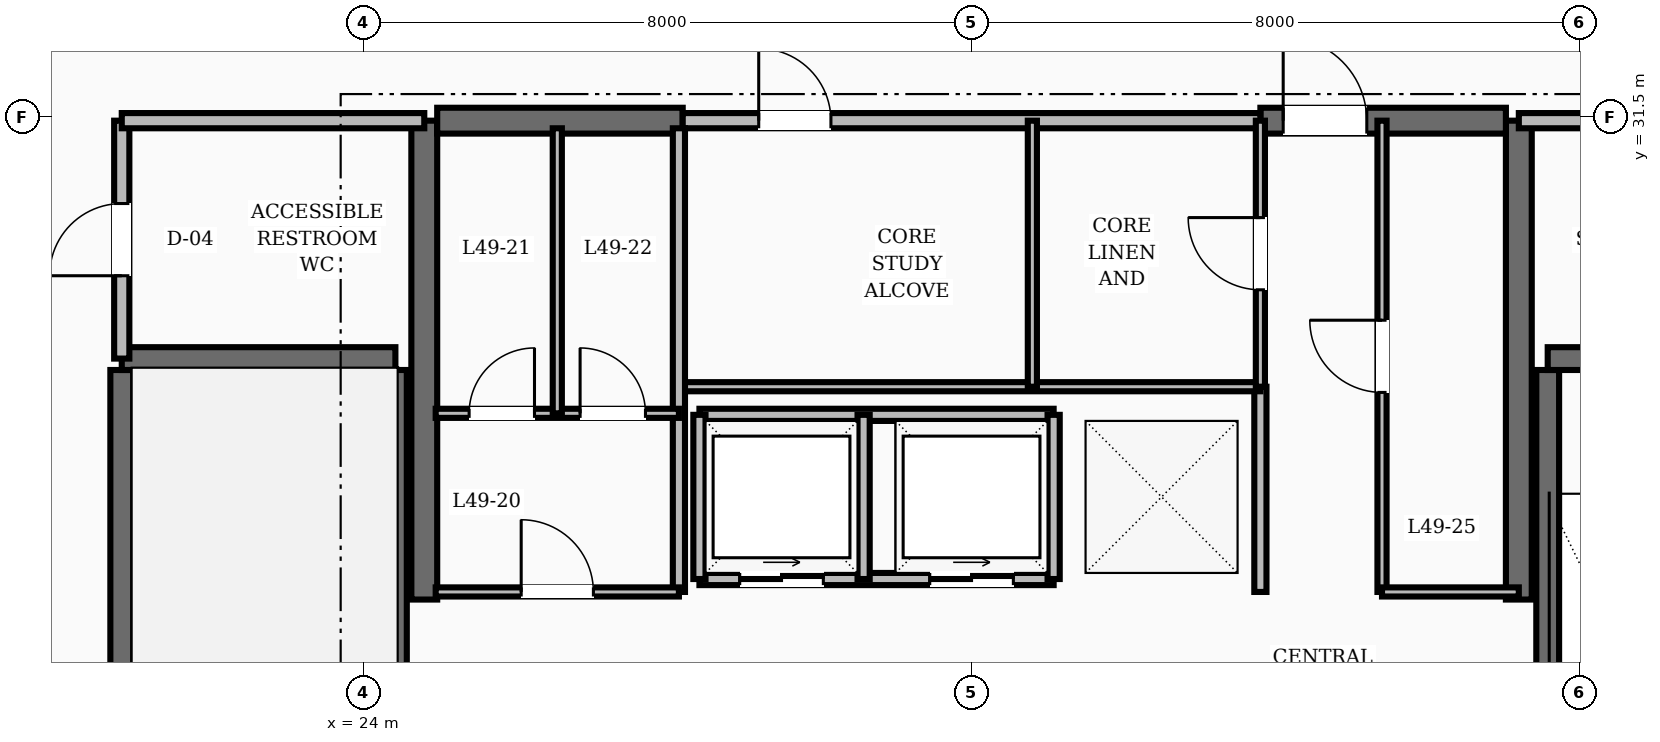
"""IFC4 building model, lengths in metres.
Left out: names, types, materials, properties, quantities, classifications, styles, units other than length and angle.
Written with IfcOpenShell. Run it as: python <this file> out.ifc"""

import sys

from ifc_helpers import new_model, si_unit, direction, frame, frame_2d, origin, place, context, subcontext, project, spatial, rectangle, extrude, element, fill, save


model = new_model("IFC4")
c1 = context("Model", 3, precision=1e-05, world=origin(), true_north=direction((0.0, 1.0)))
c2 = subcontext(c1, "Body", "Model", "MODEL_VIEW")
j1 = project(units=[si_unit("LENGTHUNIT", "METRE"), si_unit("PLANEANGLEUNIT", "RADIAN")], contexts=[c1])
p1 = place(None, origin())
s1 = spatial("IfcSite", under=j1, at=p1, CompositionType="ELEMENT")
p2 = place(p1, origin())
s2 = spatial("IfcBuilding", under=s1, at=p2, CompositionType="ELEMENT")
p3 = place(p2, frame((0.0, 0.0, 189.2)))
s3 = spatial("IfcBuildingStorey", under=s2, at=p3, CompositionType="ELEMENT", Elevation=189.2)
for number, where, z_axis, x_axis in (
    (1, (24.8, 25.15, 0.0), (0.0, 0.0, 1.0), (0.0, 1.0, 0.0)),
    (2, (39.2, 25.15, 0.0), (0.0, 0.0, 1.0), (0.0, 1.0, 0.0)),
):
    element("IfcWall", number, at=place(p3, frame(where, z_axis=z_axis, x_axis=x_axis)), inside=s3, PredefinedType="SHEAR", context=c2, shape_type="SweptSolid", body=[
        extrude(rectangle(XDim=6.3, YDim=0.34, at=frame_2d((3.15, 0.0))), origin(), (0.0, 0.0, 1.0), 3.6),
    ])
p4 = place(p3, frame((24.97, 31.45, 0.0), z_axis=(0.0, 0.0, 1.0), x_axis=(1.0, 0.0, 0.0)))
e3 = element("IfcWall", 3, at=p4, inside=s3, PredefinedType="SHEAR", context=c2, shape_type="SweptSolid", body=[
    extrude(rectangle(XDim=3.23, YDim=0.34, at=frame_2d((1.615, 0.0))), origin(), (0.0, 0.0, 1.0), 3.6),
])
p5 = place(p3, frame((35.8, 31.45, 0.0), z_axis=(0.0, 0.0, 1.0), x_axis=(1.0, 0.0, 0.0)))
e4 = element("IfcWall", 4, at=p5, inside=s3, PredefinedType="SHEAR", context=c2, shape_type="SweptSolid", body=[
    extrude(rectangle(XDim=3.23, YDim=0.34, at=frame_2d((1.615, 0.0))), origin(), (0.0, 0.0, 1.0), 3.6),
])
p6 = place(p5, frame((0.3, 0.0, 0.0)))
e5 = element("IfcOpeningElement", 5, at=p6, cuts=e4, PredefinedType="OPENING", context=c2, shape_type="SweptSolid", body=[
    extrude(rectangle(XDim=1.1, YDim=2.1, at=frame_2d((0.55, 1.05))), frame((0.0, 0.18, 0.0), z_axis=(0.0, -1.0, 0.0), x_axis=(1.0, 0.0, 0.0)), (0.0, 0.0, 1.0), 0.36),
])
for number, where, z_axis, x_axis in (
    (6, (20.82, 19.43, 0.0), (0.0, 0.0, 1.0), (0.0, 1.0, 0.0)),
    (7, (24.42, 19.43, 0.0), (0.0, 0.0, 1.0), (0.0, 1.0, 0.0)),
):
    element("IfcWall", number, at=place(p3, frame(where, z_axis=z_axis, x_axis=x_axis)), inside=s3, PredefinedType="SHEAR", context=c2, shape_type="SweptSolid", body=[
        extrude(rectangle(XDim=8.74, YDim=0.3, at=frame_2d((4.37, 0.0))), origin(), (0.0, 0.0, 1.0), 3.6),
    ])
p7 = place(p3, frame((20.82, 28.32, 0.0), z_axis=(0.0, 0.0, 1.0), x_axis=(1.0, 0.0, 0.0)))
e8 = element("IfcWall", 8, at=p7, inside=s3, PredefinedType="SHEAR", context=c2, shape_type="SweptSolid", body=[
    extrude(rectangle(XDim=3.6, YDim=0.3, at=frame_2d((1.8, 0.0))), origin(), (0.0, 0.0, 1.0), 3.6),
])
p8 = place(p3, frame((39.58, 19.43, 0.0), z_axis=(0.0, 0.0, 1.0), x_axis=(0.0, 1.0, 0.0)))
e9 = element("IfcWall", 9, at=p8, inside=s3, PredefinedType="SHEAR", context=c2, shape_type="SweptSolid", body=[
    extrude(rectangle(XDim=8.74, YDim=0.3, at=frame_2d((4.37, 0.0))), origin(), (0.0, 0.0, 1.0), 3.6),
])
p9 = place(p3, frame((39.58, 28.32, 0.0), z_axis=(0.0, 0.0, 1.0), x_axis=(1.0, 0.0, 0.0)))
e10 = element("IfcWall", 10, at=p9, inside=s3, PredefinedType="SHEAR", context=c2, shape_type="SweptSolid", body=[
    extrude(rectangle(XDim=3.6, YDim=0.3, at=frame_2d((1.8, 0.0))), origin(), (0.0, 0.0, 1.0), 3.6),
])
p10 = place(p9, frame((1.3, 0.0, 0.0)))
e11 = element("IfcOpeningElement", 11, at=p10, cuts=e10, PredefinedType="OPENING", context=c2, shape_type="SweptSolid", body=[
    extrude(rectangle(XDim=1.1, YDim=2.1, at=frame_2d((0.55, 1.05))), frame((0.0, 0.16, 0.0), z_axis=(0.0, -1.0, 0.0), x_axis=(1.0, 0.0, 0.0)), (0.0, 0.0, 1.0), 0.32),
])
p11 = place(p3, frame((39.2, 31.45, 0.0), z_axis=(0.0, 0.0, 1.0), x_axis=(1.0, 0.0, 0.0)))
e12 = element("IfcWall", 12, at=p11, inside=s3, PredefinedType="SOLIDWALL", context=c2, shape_type="SweptSolid", body=[
    extrude(rectangle(XDim=3.98, YDim=0.2, at=frame_2d((1.99, 0.0))), origin(), (0.0, 0.0, 1.0), 2.8),
])
p12 = place(p3, frame((20.82, 28.32, 0.0), z_axis=(0.0, 0.0, 1.0), x_axis=(0.0, 1.0, 0.0)))
e13 = element("IfcWall", 13, at=p12, inside=s3, PredefinedType="SOLIDWALL", context=c2, shape_type="SweptSolid", body=[
    extrude(rectangle(XDim=3.13, YDim=0.2, at=frame_2d((1.565, 0.0))), origin(), (0.0, 0.0, 1.0), 2.8),
])
p13 = place(p12, frame((1.09, 0.0, 0.0)))
e14 = element("IfcOpeningElement", 14, at=p13, cuts=e13, PredefinedType="OPENING", context=c2, shape_type="SweptSolid", body=[
    extrude(rectangle(XDim=0.95, YDim=2.1, at=frame_2d((0.475, 1.05))), frame((0.0, 0.11, 0.0), z_axis=(0.0, -1.0, 0.0), x_axis=(1.0, 0.0, 0.0)), (0.0, 0.0, 1.0), 0.22),
])
p14 = place(p3, frame((20.82, 31.45, 0.0), z_axis=(0.0, 0.0, 1.0), x_axis=(1.0, 0.0, 0.0)))
e15 = element("IfcWall", 15, at=p14, inside=s3, PredefinedType="SOLIDWALL", context=c2, shape_type="SweptSolid", body=[
    extrude(rectangle(XDim=3.98, YDim=0.2, at=frame_2d((1.99, 0.0))), origin(), (0.0, 0.0, 1.0), 2.8),
])
p15 = place(p3, frame((35.8, 25.25, 0.0), z_axis=(0.0, 0.0, 1.0), x_axis=(0.0, 1.0, 0.0)))
e16 = element("IfcWall", 16, at=p15, inside=s3, PredefinedType="SOLIDWALL", context=c2, shape_type="SweptSolid", body=[
    extrude(rectangle(XDim=2.7, YDim=0.16, at=frame_2d((1.35, 0.0))), origin(), (0.0, 0.0, 1.0), 2.8),
])
p16 = place(p3, frame((28.42, 25.42, 0.0), z_axis=(0.0, 0.0, 1.0), x_axis=(1.0, 0.0, 0.0)))
e17 = element("IfcWall", 17, at=p16, inside=s3, PredefinedType="SOLIDWALL", context=c2, shape_type="SweptSolid", body=[
    extrude(rectangle(XDim=4.66, YDim=0.16, at=frame_2d((2.33, 0.0))), origin(), (0.0, 0.0, 1.0), 2.8),
])
p17 = place(p16, frame((0.53, 0.0, 0.0)))
e18 = element("IfcOpeningElement", 18, at=p17, cuts=e17, PredefinedType="OPENING", context=c2, shape_type="SweptSolid", body=[
    extrude(rectangle(XDim=1.1, YDim=2.15, at=frame_2d((0.55, 1.075))), frame((0.0, 0.09, 0.0), z_axis=(0.0, -1.0, 0.0), x_axis=(1.0, 0.0, 0.0)), (0.0, 0.0, 1.0), 0.18),
])
p18 = place(p16, frame((3.03, 0.0, 0.0)))
e19 = element("IfcOpeningElement", 19, at=p18, cuts=e17, PredefinedType="OPENING", context=c2, shape_type="SweptSolid", body=[
    extrude(rectangle(XDim=1.1, YDim=2.15, at=frame_2d((0.55, 1.075))), frame((0.0, 0.09, 0.0), z_axis=(0.0, -1.0, 0.0), x_axis=(1.0, 0.0, 0.0)), (0.0, 0.0, 1.0), 0.18),
])
p19 = place(p3, frame((28.42, 27.58, 0.0), z_axis=(0.0, 0.0, 1.0), x_axis=(1.0, 0.0, 0.0)))
e20 = element("IfcWall", 20, at=p19, inside=s3, PredefinedType="SOLIDWALL", context=c2, shape_type="SweptSolid", body=[
    extrude(rectangle(XDim=4.66, YDim=0.16, at=frame_2d((2.33, 0.0))), origin(), (0.0, 0.0, 1.0), 2.8),
])
for number, where, z_axis, x_axis in (
    (21, (28.42, 25.42, 0.0), (0.0, 0.0, 1.0), (0.0, 1.0, 0.0)),
    (22, (30.58, 25.42, 0.0), (0.0, 0.0, 1.0), (0.0, 1.0, 0.0)),
    (23, (33.08, 25.42, 0.0), (0.0, 0.0, 1.0), (0.0, 1.0, 0.0)),
):
    element("IfcWall", number, at=place(p3, frame(where, z_axis=z_axis, x_axis=x_axis)), inside=s3, PredefinedType="SOLIDWALL", context=c2, shape_type="SweptSolid", body=[
        extrude(rectangle(XDim=2.16, YDim=0.16, at=frame_2d((1.08, 0.0))), origin(), (0.0, 0.0, 1.0), 2.8),
    ])
p20 = place(p3, frame((28.2, 31.45, 0.0), z_axis=(0.0, 0.0, 1.0), x_axis=(1.0, 0.0, 0.0)))
e24 = element("IfcWall", 24, at=p20, inside=s3, PredefinedType="SOLIDWALL", context=c2, shape_type="SweptSolid", body=[
    extrude(rectangle(XDim=7.6, YDim=0.2, at=frame_2d((3.8, 0.0))), origin(), (0.0, 0.0, 1.0), 2.8),
])
p21 = place(p20, frame((1.0, 0.0, 0.0)))
e25 = element("IfcOpeningElement", 25, at=p21, cuts=e24, PredefinedType="OPENING", context=c2, shape_type="SweptSolid", body=[
    extrude(rectangle(XDim=0.95, YDim=2.1, at=frame_2d((0.475, 1.05))), frame((0.0, 0.11, 0.0), z_axis=(0.0, -1.0, 0.0), x_axis=(1.0, 0.0, 0.0)), (0.0, 0.0, 1.0), 0.22),
])
p22 = place(p3, frame((28.2, 27.95, 0.0), z_axis=(0.0, 0.0, 1.0), x_axis=(1.0, 0.0, 0.0)))
e26 = element("IfcWall", 26, at=p22, inside=s3, PredefinedType="PARTITIONING", context=c2, shape_type="SweptSolid", body=[
    extrude(rectangle(XDim=7.6, YDim=0.12, at=frame_2d((3.8, 0.0))), origin(), (0.0, 0.0, 1.0), 2.8),
])
p23 = place(p3, frame((35.8, 27.95, 0.0), z_axis=(0.0, 0.0, 1.0), x_axis=(0.0, 1.0, 0.0)))
e27 = element("IfcWall", 27, at=p23, inside=s3, PredefinedType="PARTITIONING", context=c2, shape_type="SweptSolid", body=[
    extrude(rectangle(XDim=3.5, YDim=0.12, at=frame_2d((1.75, 0.0))), origin(), (0.0, 0.0, 1.0), 2.8),
])
p24 = place(p23, frame((1.275, 0.0, 0.0)))
e28 = element("IfcOpeningElement", 28, at=p24, cuts=e27, PredefinedType="OPENING", context=c2, shape_type="SweptSolid", body=[
    extrude(rectangle(XDim=0.95, YDim=2.1, at=frame_2d((0.475, 1.05))), frame((0.0, 0.07, 0.0), z_axis=(0.0, -1.0, 0.0), x_axis=(1.0, 0.0, 0.0)), (0.0, 0.0, 1.0), 0.14),
])
p25 = place(p3, frame((32.8, 27.95, 0.0), z_axis=(0.0, 0.0, 1.0), x_axis=(0.0, 1.0, 0.0)))
e29 = element("IfcWall", 29, at=p25, inside=s3, PredefinedType="PARTITIONING", context=c2, shape_type="SweptSolid", body=[
    extrude(rectangle(XDim=3.5, YDim=0.12, at=frame_2d((1.75, 0.0))), origin(), (0.0, 0.0, 1.0), 2.8),
])
p26 = place(p3, frame((28.15, 25.25, 0.0), z_axis=(0.0, 0.0, 1.0), x_axis=(0.0, 1.0, 0.0)))
e30 = element("IfcWall", 30, at=p26, inside=s3, PredefinedType="SOLIDWALL", context=c2, shape_type="SweptSolid", body=[
    extrude(rectangle(XDim=6.1, YDim=0.16, at=frame_2d((3.05, 0.0))), origin(), (0.0, 0.0, 1.0), 2.8),
])
p27 = place(p3, frame((24.95, 25.25, 0.0), z_axis=(0.0, 0.0, 1.0), x_axis=(1.0, 0.0, 0.0)))
e31 = element("IfcWall", 31, at=p27, inside=s3, PredefinedType="PARTITIONING", context=c2, shape_type="SweptSolid", body=[
    extrude(rectangle(XDim=3.2, YDim=0.12, at=frame_2d((1.6, 0.0))), origin(), (0.0, 0.0, 1.0), 2.8),
])
p28 = place(p27, frame((1.125, 0.0, 0.0)))
e32 = element("IfcOpeningElement", 32, at=p28, cuts=e31, PredefinedType="OPENING", context=c2, shape_type="SweptSolid", body=[
    extrude(rectangle(XDim=0.95, YDim=2.1, at=frame_2d((0.475, 1.05))), frame((0.0, 0.07, 0.0), z_axis=(0.0, -1.0, 0.0), x_axis=(1.0, 0.0, 0.0)), (0.0, 0.0, 1.0), 0.14),
])
p29 = place(p3, frame((37.4, 25.25, 0.0), z_axis=(0.0, 0.0, 1.0), x_axis=(0.0, 1.0, 0.0)))
e33 = element("IfcWall", 33, at=p29, inside=s3, PredefinedType="PARTITIONING", context=c2, shape_type="SweptSolid", body=[
    extrude(rectangle(XDim=6.2, YDim=0.12, at=frame_2d((3.1, 0.0))), origin(), (0.0, 0.0, 1.0), 2.8),
])
p30 = place(p29, frame((2.625, 0.0, 0.0)))
e34 = element("IfcOpeningElement", 34, at=p30, cuts=e33, PredefinedType="OPENING", context=c2, shape_type="SweptSolid", body=[
    extrude(rectangle(XDim=0.95, YDim=2.1, at=frame_2d((0.475, 1.05))), frame((0.0, 0.07, 0.0), z_axis=(0.0, -1.0, 0.0), x_axis=(1.0, 0.0, 0.0)), (0.0, 0.0, 1.0), 0.14),
])
p31 = place(p3, frame((37.4, 25.25, 0.0), z_axis=(0.0, 0.0, 1.0), x_axis=(1.0, 0.0, 0.0)))
e35 = element("IfcWall", 35, at=p31, inside=s3, PredefinedType="PARTITIONING", context=c2, shape_type="SweptSolid", body=[
    extrude(rectangle(XDim=1.8, YDim=0.12, at=frame_2d((0.9, 0.0))), origin(), (0.0, 0.0, 1.0), 2.8),
])
p32 = place(p3, frame((24.95, 27.6, 0.0), z_axis=(0.0, 0.0, 1.0), x_axis=(1.0, 0.0, 0.0)))
e36 = element("IfcWall", 36, at=p32, inside=s3, PredefinedType="PARTITIONING", context=c2, shape_type="SweptSolid", body=[
    extrude(rectangle(XDim=3.2, YDim=0.12, at=frame_2d((1.6, 0.0))), origin(), (0.0, 0.0, 1.0), 2.8),
])
p33 = place(p32, frame((0.44, 0.0, 0.0)))
e37 = element("IfcOpeningElement", 37, at=p33, cuts=e36, PredefinedType="OPENING", context=c2, shape_type="SweptSolid", body=[
    extrude(rectangle(XDim=0.86, YDim=2.1, at=frame_2d((0.43, 1.05))), frame((0.0, 0.07, 0.0), z_axis=(0.0, -1.0, 0.0), x_axis=(1.0, 0.0, 0.0)), (0.0, 0.0, 1.0), 0.14),
])
p34 = place(p32, frame((1.9, 0.0, 0.0)))
e38 = element("IfcOpeningElement", 38, at=p34, cuts=e36, PredefinedType="OPENING", context=c2, shape_type="SweptSolid", body=[
    extrude(rectangle(XDim=0.86, YDim=2.1, at=frame_2d((0.43, 1.05))), frame((0.0, 0.07, 0.0), z_axis=(0.0, -1.0, 0.0), x_axis=(1.0, 0.0, 0.0)), (0.0, 0.0, 1.0), 0.14),
])
p35 = place(p3, frame((26.55, 27.6, 0.0), z_axis=(0.0, 0.0, 1.0), x_axis=(0.0, 1.0, 0.0)))
e39 = element("IfcWall", 39, at=p35, inside=s3, PredefinedType="PARTITIONING", context=c2, shape_type="SweptSolid", body=[
    extrude(rectangle(XDim=3.75, YDim=0.12, at=frame_2d((1.875, 0.0))), origin(), (0.0, 0.0, 1.0), 2.8),
])
p36 = place(p13, origin())
e40 = element("IfcDoor", 40, at=p36, inside=s3, OperationType="SINGLE_SWING_LEFT", PredefinedType="DOOR", context=c2, shape_type="SweptSolid", body=[
    extrude(rectangle(XDim=0.95, YDim=2.1, at=frame_2d((0.475, 1.05))), frame((0.0, 0.025, 0.0), z_axis=(0.0, -1.0, 0.0), x_axis=(1.0, 0.0, 0.0)), (0.0, 0.0, 1.0), 0.05),
])
fill(e14, e40)
p37 = place(p6, origin())
e41 = element("IfcDoor", 41, at=p37, inside=s3, OperationType="SINGLE_SWING_LEFT", PredefinedType="DOOR", context=c2, shape_type="SweptSolid", body=[
    extrude(rectangle(XDim=1.1, YDim=2.1, at=frame_2d((0.55, 1.05))), frame((0.0, 0.025, 0.0), z_axis=(0.0, -1.0, 0.0), x_axis=(1.0, 0.0, 0.0)), (0.0, 0.0, 1.0), 0.05),
])
fill(e5, e41)
p38 = place(p17, origin())
e42 = element("IfcDoor", 42, at=p38, inside=s3, OperationType="SLIDING_TO_RIGHT", PredefinedType="DOOR", context=c2, shape_type="SweptSolid", body=[
    extrude(rectangle(XDim=1.1, YDim=2.15, at=frame_2d((0.55, 1.075))), frame((0.0, 0.025, 0.0), z_axis=(0.0, -1.0, 0.0), x_axis=(1.0, 0.0, 0.0)), (0.0, 0.0, 1.0), 0.05),
])
fill(e18, e42)
p39 = place(p18, origin())
e43 = element("IfcDoor", 43, at=p39, inside=s3, OperationType="SLIDING_TO_RIGHT", PredefinedType="DOOR", context=c2, shape_type="SweptSolid", body=[
    extrude(rectangle(XDim=1.1, YDim=2.15, at=frame_2d((0.55, 1.075))), frame((0.0, 0.025, 0.0), z_axis=(0.0, -1.0, 0.0), x_axis=(1.0, 0.0, 0.0)), (0.0, 0.0, 1.0), 0.05),
])
fill(e19, e43)
p40 = place(p21, origin())
e44 = element("IfcDoor", 44, at=p40, inside=s3, OperationType="SINGLE_SWING_LEFT", PredefinedType="DOOR", context=c2, shape_type="SweptSolid", body=[
    extrude(rectangle(XDim=0.95, YDim=2.1, at=frame_2d((0.475, 1.05))), frame((0.0, 0.025, 0.0), z_axis=(0.0, -1.0, 0.0), x_axis=(1.0, 0.0, 0.0)), (0.0, 0.0, 1.0), 0.05),
])
fill(e25, e44)
p41 = place(p24, origin())
e45 = element("IfcDoor", 45, at=p41, inside=s3, OperationType="SINGLE_SWING_RIGHT", PredefinedType="DOOR", context=c2, shape_type="SweptSolid", body=[
    extrude(rectangle(XDim=0.95, YDim=2.1, at=frame_2d((0.475, 1.05))), frame((0.0, 0.025, 0.0), z_axis=(0.0, -1.0, 0.0), x_axis=(1.0, 0.0, 0.0)), (0.0, 0.0, 1.0), 0.05),
])
fill(e28, e45)
p42 = place(p28, origin())
e46 = element("IfcDoor", 46, at=p42, inside=s3, OperationType="SINGLE_SWING_LEFT", PredefinedType="DOOR", context=c2, shape_type="SweptSolid", body=[
    extrude(rectangle(XDim=0.95, YDim=2.1, at=frame_2d((0.475, 1.05))), frame((0.0, 0.025, 0.0), z_axis=(0.0, -1.0, 0.0), x_axis=(1.0, 0.0, 0.0)), (0.0, 0.0, 1.0), 0.05),
])
fill(e32, e46)
p43 = place(p33, origin())
e47 = element("IfcDoor", 47, at=p43, inside=s3, OperationType="SINGLE_SWING_RIGHT", PredefinedType="DOOR", context=c2, shape_type="SweptSolid", body=[
    extrude(rectangle(XDim=0.86, YDim=2.1, at=frame_2d((0.43, 1.05))), frame((0.0, 0.025, 0.0), z_axis=(0.0, -1.0, 0.0), x_axis=(1.0, 0.0, 0.0)), (0.0, 0.0, 1.0), 0.05),
])
fill(e37, e47)
p44 = place(p34, origin())
e48 = element("IfcDoor", 48, at=p44, inside=s3, OperationType="SINGLE_SWING_LEFT", PredefinedType="DOOR", context=c2, shape_type="SweptSolid", body=[
    extrude(rectangle(XDim=0.86, YDim=2.1, at=frame_2d((0.43, 1.05))), frame((0.0, 0.025, 0.0), z_axis=(0.0, -1.0, 0.0), x_axis=(1.0, 0.0, 0.0)), (0.0, 0.0, 1.0), 0.05),
])
fill(e38, e48)
p45 = place(p30, origin())
e49 = element("IfcDoor", 49, at=p45, inside=s3, OperationType="SINGLE_SWING_RIGHT", PredefinedType="DOOR", context=c2, shape_type="SweptSolid", body=[
    extrude(rectangle(XDim=0.95, YDim=2.1, at=frame_2d((0.475, 1.05))), frame((0.0, 0.025, 0.0), z_axis=(0.0, -1.0, 0.0), x_axis=(1.0, 0.0, 0.0)), (0.0, 0.0, 1.0), 0.05),
])
fill(e34, e49)
save(model, sys.argv[1])
